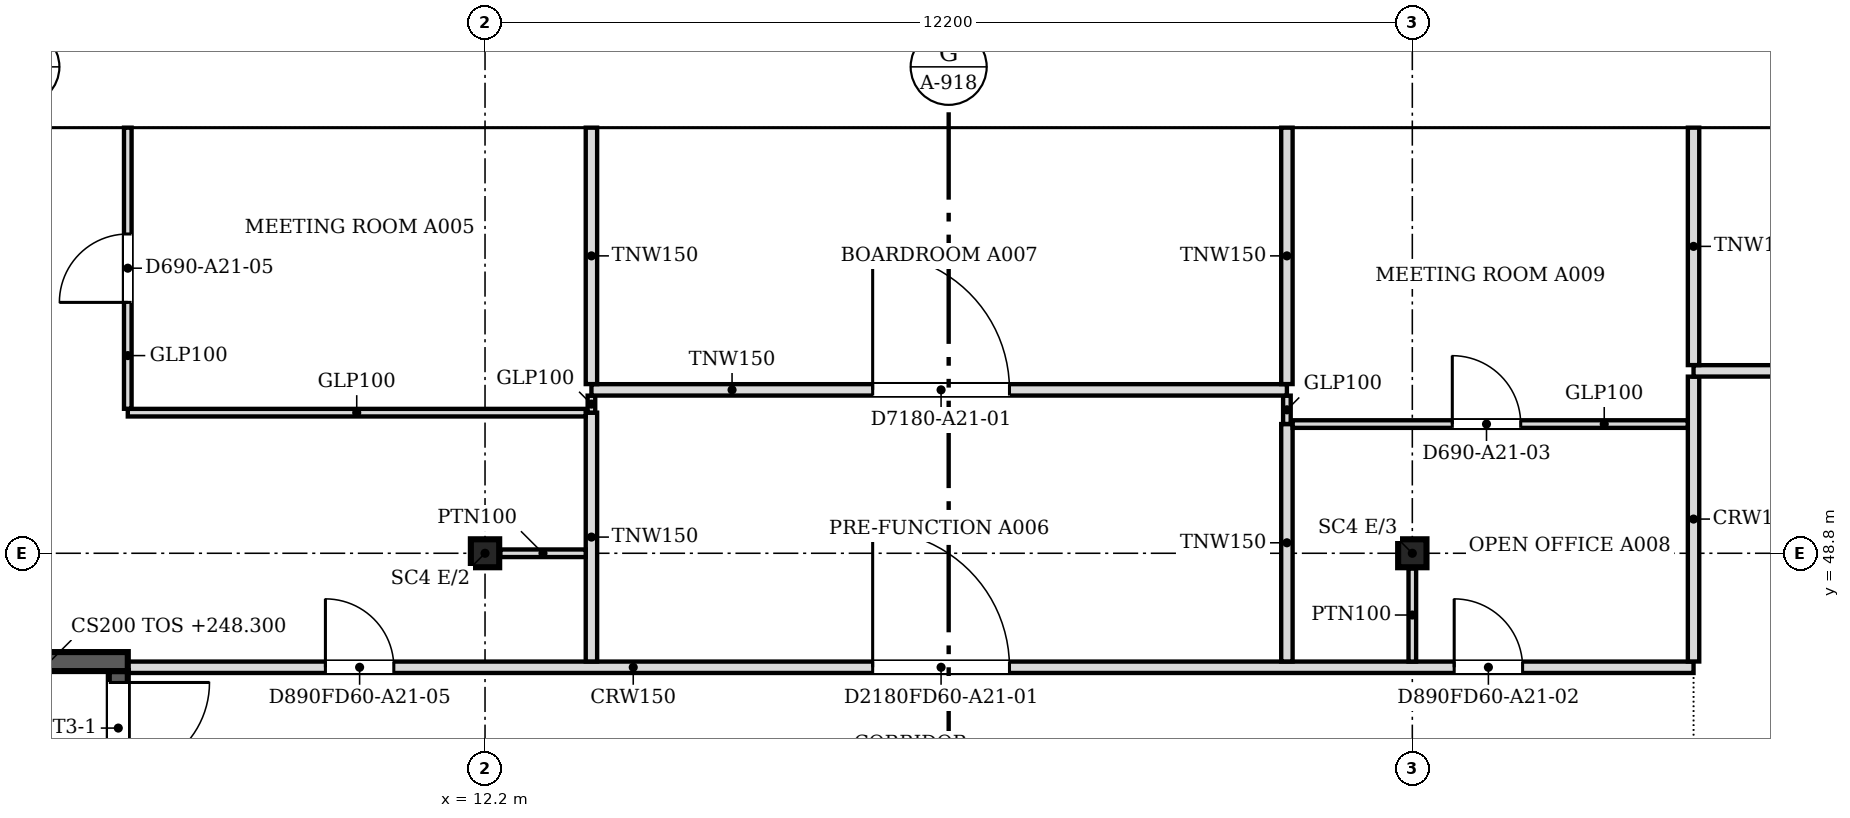
"""IFC4 building model, lengths in metres.
Left out: names, types, materials, properties, quantities, classifications, styles, units other than length and angle.
Written with IfcOpenShell. Run it as: python <this file> out.ifc"""

import sys

from ifc_helpers import new_model, si_unit, direction, frame, frame_2d, origin, origin_2d, place, context, subcontext, project, spatial, polyline, rectangle, i_section, outline, extrude, faceted_brep, source, transform, mapped, element, fill, save


model = new_model("IFC4")
c1 = context("Model", 3, precision=1e-05, world=origin(), true_north=direction((0.0, 1.0)))
c2 = subcontext(c1, "Body", "Model", "MODEL_VIEW")
j1 = project(units=[si_unit("LENGTHUNIT", "METRE"), si_unit("PLANEANGLEUNIT", "RADIAN")], contexts=[c1])
p1 = place(None, origin())
s1 = spatial("IfcSite", under=j1, at=p1, CompositionType="ELEMENT")
p2 = place(p1, origin())
s2 = spatial("IfcBuilding", under=s1, at=p2, CompositionType="ELEMENT")
p3 = place(p2, frame((0.0, 0.0, 248.3)))
s3 = spatial("IfcBuildingStorey", under=s2, at=p3, CompositionType="ELEMENT", Elevation=248.3)
for number, where, z_axis, x_axis in (
    (1, (12.2, 48.8, 0.0), (0.0, 0.0, 1.0), (1.0, 0.0, 0.0)),
    (2, (24.4, 48.8, 0.0), (0.0, 0.0, 1.0), (1.0, 0.0, 0.0)),
):
    element("IfcColumn", number, at=place(p3, frame(where, z_axis=z_axis, x_axis=x_axis)), inside=s3, PredefinedType="COLUMN", context=c2, shape_type="SweptSolid", body=[
        extrude(i_section(OverallWidth=0.373, OverallDepth=0.368, WebThickness=0.015, FlangeThickness=0.024, at=origin_2d()), origin(), (0.0, 0.0, 1.0), 3.6),
    ])
m1 = source(origin(), c2, "Body", "SweptSolid", [
    extrude(outline(polyline([(3.05, 0.0), (6.1, 3.8), (3.05, 7.6), (0.0, 3.8), (3.05, 0.0)])), frame((0.0, 0.25, 0.0), z_axis=(0.0, -1.0, 0.0), x_axis=(1.0, 0.0, 0.0)), (0.0, 0.0, 1.0), 0.5),
])
p4 = place(p3, frame((30.5, 54.65, -3.8), z_axis=(0.0, 0.0, 1.0), x_axis=(-1.0, 0.0, 0.0)))
e3 = element("IfcWall", 3, at=p4, inside=s3, PredefinedType="SOLIDWALL", context=c2, shape_type="MappedRepresentation", body=[
    mapped(m1, transform((0.0, 0.0, 0.0), scale=1.0)),
])
m2 = source(origin(), c2, "Body", "SweptSolid", [
    extrude(outline(polyline([(3.05, 0.399), (5.78, 3.8), (3.05, 7.201), (0.321, 3.8), (3.05, 0.399)])), frame((0.0, 0.26, 0.0), z_axis=(0.0, -1.0, 0.0), x_axis=(1.0, 0.0, 0.0)), (0.0, 0.0, 1.0), 0.52),
])
p5 = place(p4, origin())
e4 = element("IfcOpeningElement", 4, at=p5, cuts=e3, PredefinedType="OPENING", context=c2, shape_type="MappedRepresentation", body=[
    mapped(m2, transform((0.0, 0.0, 0.0), scale=1.0)),
])
m3 = source(origin(), c2, "Body", "Brep", [
    faceted_brep([(3.05, -0.25, 0.0), (6.1, -0.25, 3.8), (6.1, -0.25, 3.8), (3.05, -0.25, 7.6), (0.0, -0.25, 3.8), (0.0, 0.25, 3.8), (3.05, 0.25, 7.6), (6.1, 0.25, 3.8), (6.1, 0.25, 3.8), (3.05, 0.25, 0.0)], [[[0, 1, 2, 3, 4]], [[5, 6, 7, 8, 9]], [[9, 8, 1, 0]], [[7, 6, 3, 2]], [[6, 5, 4, 3]], [[5, 9, 0, 4]], [[1, 8, 7, 2]]]),
])
p6 = place(p3, frame((24.4, 54.65, -3.8), z_axis=(0.0, 0.0, 1.0), x_axis=(-1.0, 0.0, 0.0)))
e5 = element("IfcWall", 5, at=p6, inside=s3, PredefinedType="SOLIDWALL", context=c2, shape_type="MappedRepresentation", body=[
    mapped(m3, transform((0.0, 0.0, 0.0), scale=1.0)),
])
p7 = place(p6, origin())
e6 = element("IfcOpeningElement", 6, at=p7, cuts=e5, PredefinedType="OPENING", context=c2, shape_type="MappedRepresentation", body=[
    mapped(m2, transform((0.0, 0.0, 0.0), scale=1.0)),
])
p8 = place(p3, frame((18.3, 54.65, -3.8), z_axis=(0.0, 0.0, 1.0), x_axis=(-1.0, 0.0, 0.0)))
e7 = element("IfcWall", 7, at=p8, inside=s3, PredefinedType="SOLIDWALL", context=c2, shape_type="MappedRepresentation", body=[
    mapped(m1, transform((0.0, 0.0, 0.0), scale=1.0)),
])
p9 = place(p8, origin())
e8 = element("IfcOpeningElement", 8, at=p9, cuts=e7, PredefinedType="OPENING", context=c2, shape_type="MappedRepresentation", body=[
    mapped(m2, transform((0.0, 0.0, 0.0), scale=1.0)),
])
m4 = source(origin(), c2, "Body", "Brep", [
    faceted_brep([(3.05, -0.25, 0.0), (6.053, -0.25, 3.8), (3.05, -0.25, 7.6), (0.0, -0.25, 3.8), (0.0, 0.25, 3.8), (3.05, 0.25, 7.6), (6.007, 0.25, 3.859), (6.007, 0.25, 3.741), (3.05, 0.25, 0.0), (6.053, 0.0, 3.8)], [[[0, 1, 2, 3]], [[4, 5, 6, 7, 8]], [[8, 7, 9, 1, 0]], [[6, 5, 2, 1, 9]], [[5, 4, 3, 2]], [[4, 8, 0, 3]], [[9, 7, 6]]]),
])
p10 = place(p3, frame((12.2, 54.65, -3.8), z_axis=(0.0, 0.0, 1.0), x_axis=(-1.0, 0.0, 0.0)))
e9 = element("IfcWall", 9, at=p10, inside=s3, PredefinedType="SOLIDWALL", context=c2, shape_type="MappedRepresentation", body=[
    mapped(m4, transform((0.0, 0.0, 0.0), scale=1.0)),
])
m5 = source(origin(), c2, "Body", "SweptSolid", [
    extrude(outline(polyline([(3.049, 0.401), (5.735, 3.8), (3.049, 7.199), (0.321, 3.8), (3.049, 0.401)])), frame((0.0, 0.26, 0.0), z_axis=(0.0, -1.0, 0.0), x_axis=(1.0, 0.0, 0.0)), (0.0, 0.0, 1.0), 0.52),
])
p11 = place(p10, origin())
e10 = element("IfcOpeningElement", 10, at=p11, cuts=e9, PredefinedType="OPENING", context=c2, shape_type="MappedRepresentation", body=[
    mapped(m5, transform((0.0, 0.0, 0.0), scale=1.0)),
])
p12 = place(p2, frame((0.0, 0.0, 252.1)))
s4 = spatial("IfcBuildingStorey", under=s2, at=p12, CompositionType="ELEMENT", Elevation=252.1)
m6 = source(origin(), c2, "Body", "SweptSolid", [
    extrude(outline(polyline([(3.05, 0.0), (6.1, 3.8), (3.05, 7.6), (0.0, 3.8), (3.05, 0.0)])), frame((0.0, 0.25, 0.0), z_axis=(0.0, -1.0, 0.0), x_axis=(1.0, 0.0, 0.0)), (0.0, 0.0, 1.0), 0.5),
])
p13 = place(p12, frame((33.55, 54.65, -3.8), z_axis=(0.0, 0.0, 1.0), x_axis=(-1.0, 0.0, 0.0)))
e11 = element("IfcWall", 11, at=p13, inside=s4, PredefinedType="SOLIDWALL", context=c2, shape_type="MappedRepresentation", body=[
    mapped(m6, transform((0.0, 0.0, 0.0), scale=1.0)),
])
m7 = source(origin(), c2, "Body", "SweptSolid", [
    extrude(outline(polyline([(3.05, 0.399), (5.78, 3.8), (3.05, 7.2), (0.321, 3.8), (3.05, 0.399)])), frame((0.0, 0.26, 0.0), z_axis=(0.0, -1.0, 0.0), x_axis=(1.0, 0.0, 0.0)), (0.0, 0.0, 1.0), 0.52),
])
p14 = place(p13, origin())
e12 = element("IfcOpeningElement", 12, at=p14, cuts=e11, PredefinedType="OPENING", context=c2, shape_type="MappedRepresentation", body=[
    mapped(m7, transform((0.0, 0.0, 0.0), scale=1.0)),
])
m8 = source(origin(), c2, "Body", "Brep", [
    faceted_brep([(3.05, -0.25, 0.0), (6.1, -0.25, 3.8), (6.1, -0.25, 3.8), (3.05, -0.25, 7.6), (0.0, -0.25, 3.8), (0.0, 0.25, 3.8), (3.05, 0.25, 7.6), (6.1, 0.25, 3.8), (6.1, 0.25, 3.8), (3.05, 0.25, 0.0)], [[[0, 1, 2, 3, 4]], [[5, 6, 7, 8, 9]], [[9, 8, 1, 0]], [[7, 6, 3, 2]], [[6, 5, 4, 3]], [[5, 9, 0, 4]], [[1, 8, 7, 2]]]),
])
p15 = place(p12, frame((27.45, 54.65, -3.8), z_axis=(0.0, 0.0, 1.0), x_axis=(-1.0, 0.0, 0.0)))
e13 = element("IfcWall", 13, at=p15, inside=s4, PredefinedType="SOLIDWALL", context=c2, shape_type="MappedRepresentation", body=[
    mapped(m8, transform((0.0, 0.0, 0.0), scale=1.0)),
])
p16 = place(p15, origin())
e14 = element("IfcOpeningElement", 14, at=p16, cuts=e13, PredefinedType="OPENING", context=c2, shape_type="MappedRepresentation", body=[
    mapped(m7, transform((0.0, 0.0, 0.0), scale=1.0)),
])
p17 = place(p12, frame((21.35, 54.65, -3.8), z_axis=(0.0, 0.0, 1.0), x_axis=(-1.0, 0.0, 0.0)))
e15 = element("IfcWall", 15, at=p17, inside=s4, PredefinedType="SOLIDWALL", context=c2, shape_type="MappedRepresentation", body=[
    mapped(m6, transform((0.0, 0.0, 0.0), scale=1.0)),
])
p18 = place(p17, origin())
e16 = element("IfcOpeningElement", 16, at=p18, cuts=e15, PredefinedType="OPENING", context=c2, shape_type="MappedRepresentation", body=[
    mapped(m7, transform((0.0, 0.0, 0.0), scale=1.0)),
])
p19 = place(p12, frame((15.25, 54.65, -3.8), z_axis=(0.0, 0.0, 1.0), x_axis=(-1.0, 0.0, 0.0)))
e17 = element("IfcWall", 17, at=p19, inside=s4, PredefinedType="SOLIDWALL", context=c2, shape_type="MappedRepresentation", body=[
    mapped(m6, transform((0.0, 0.0, 0.0), scale=1.0)),
])
p20 = place(p19, origin())
e18 = element("IfcOpeningElement", 18, at=p20, cuts=e17, PredefinedType="OPENING", context=c2, shape_type="MappedRepresentation", body=[
    mapped(m7, transform((0.0, 0.0, 0.0), scale=1.0)),
])
m9 = source(origin(), c2, "Body", "Brep", [
    faceted_brep([(3.003, -0.25, 0.0), (3.05, -0.25, 0.06), (3.05, -0.25, 7.54), (3.003, -0.25, 7.6), (0.0, -0.25, 3.8), (0.0, 0.25, 3.8), (2.957, 0.25, 7.541), (2.957, 0.25, 0.059), (3.003, 0.0, 0.0), (3.003, 0.0, 7.6)], [[[0, 1, 2, 3, 4]], [[5, 6, 7]], [[1, 0, 8]], [[9, 3, 2]], [[6, 5, 4, 3, 9]], [[5, 7, 8, 0, 4]], [[1, 8, 7, 6, 9, 2]]]),
])
p21 = place(p12, frame((9.15, 54.65, -3.8), z_axis=(0.0, 0.0, 1.0), x_axis=(-1.0, 0.0, 0.0)))
e19 = element("IfcWall", 19, at=p21, inside=s4, PredefinedType="SOLIDWALL", context=c2, shape_type="MappedRepresentation", body=[
    mapped(m9, transform((0.0, 0.0, 0.0), scale=1.0)),
])
m10 = source(origin(), c2, "Body", "SweptSolid", [
    extrude(outline(polyline([(2.803, 6.944), (0.319, 3.8), (2.803, 0.656), (2.803, 6.944)])), frame((0.0, 0.26, 0.0), z_axis=(0.0, -1.0, 0.0), x_axis=(1.0, 0.0, 0.0)), (0.0, 0.0, 1.0), 0.52),
])
p22 = place(p21, origin())
e20 = element("IfcOpeningElement", 20, at=p22, cuts=e19, PredefinedType="OPENING", context=c2, shape_type="MappedRepresentation", body=[
    mapped(m10, transform((0.0, 0.0, 0.0), scale=1.0)),
])
p23 = place(p3, frame((3.6, 47.375, 0.0), z_axis=(0.0, 0.0, 1.0), x_axis=(1.0, 0.0, 0.0)))
e21 = element("IfcWall", 21, at=p23, inside=s3, PredefinedType="SOLIDWALL", context=c2, shape_type="SweptSolid", body=[
    extrude(rectangle(XDim=3.9, YDim=0.25, at=frame_2d((1.95, 0.0))), origin(), (0.0, 0.0, 1.0), 3.8),
])
p24 = place(p3, frame((7.375, 47.25, 0.0), z_axis=(0.0, 0.0, 1.0), x_axis=(0.0, -1.0, 0.0)))
e22 = element("IfcWall", 22, at=p24, inside=s3, PredefinedType="SOLIDWALL", context=c2, shape_type="SweptSolid", body=[
    extrude(rectangle(XDim=8.0, YDim=0.25, at=frame_2d((4.0, 0.0))), origin(), (0.0, 0.0, 1.0), 3.8),
])
m11 = source(origin(), c2, "Body", "SweptSolid", [
    extrude(rectangle(XDim=1.2, YDim=2.1, at=frame_2d((0.6, 1.05))), frame((0.0, 0.135, 0.0), z_axis=(0.0, -1.0, 0.0), x_axis=(1.0, 0.0, 0.0)), (0.0, 0.0, 1.0), 0.27),
])
p25 = place(p24, frame((0.15, 0.0, 0.0)))
e23 = element("IfcOpeningElement", 23, at=p25, cuts=e22, PredefinedType="OPENING", context=c2, shape_type="MappedRepresentation", body=[
    mapped(m11, transform((0.0, 0.0, 0.0), scale=1.0)),
])
p26 = place(p3, frame((7.5, 47.3, 0.0), z_axis=(0.0, 0.0, 1.0), x_axis=(1.0, 0.0, 0.0)))
e24 = element("IfcWall", 24, at=p26, inside=s3, PredefinedType="PARTITIONING", context=c2, shape_type="SweptSolid", body=[
    extrude(rectangle(XDim=20.6, YDim=0.15, at=frame_2d((10.3, 0.0))), origin(), (0.0, 0.0, 1.0), 3.067),
])
m12 = source(origin(), c2, "Body", "SweptSolid", [
    extrude(rectangle(XDim=0.9, YDim=2.1, at=frame_2d((0.45, 1.05))), frame((0.0, 0.085, 0.0), z_axis=(0.0, -1.0, 0.0), x_axis=(1.0, 0.0, 0.0)), (0.0, 0.0, 1.0), 0.17),
])
p27 = place(p26, frame((17.451, 0.0, 0.0)))
e25 = element("IfcOpeningElement", 25, at=p27, cuts=e24, PredefinedType="OPENING", context=c2, shape_type="MappedRepresentation", body=[
    mapped(m12, transform((0.0, 0.0, 0.0), scale=1.0)),
])
p28 = place(p26, frame((2.6, 0.0, 0.0)))
e26 = element("IfcOpeningElement", 26, at=p28, cuts=e24, PredefinedType="OPENING", context=c2, shape_type="MappedRepresentation", body=[
    mapped(m12, transform((0.0, 0.0, 0.0), scale=1.0)),
])
m13 = source(origin(), c2, "Body", "SweptSolid", [
    extrude(rectangle(XDim=1.8, YDim=2.1, at=frame_2d((0.9, 1.05))), frame((0.0, 0.085, 0.0), z_axis=(0.0, -1.0, 0.0), x_axis=(1.0, 0.0, 0.0)), (0.0, 0.0, 1.0), 0.17),
])
p29 = place(p26, frame((9.8, 0.0, 0.0)))
e27 = element("IfcOpeningElement", 27, at=p29, cuts=e24, PredefinedType="OPENING", context=c2, shape_type="MappedRepresentation", body=[
    mapped(m13, transform((0.0, 0.0, 0.0), scale=1.0)),
])
p30 = place(p3, frame((13.6, 47.376, 0.0), z_axis=(0.0, 0.0, 1.0), x_axis=(0.0, 1.0, 0.0)))
e28 = element("IfcWall", 28, at=p30, inside=s3, PredefinedType="PARTITIONING", context=c2, shape_type="SweptSolid", body=[
    extrude(rectangle(XDim=3.274, YDim=0.15, at=frame_2d((1.637, 0.0))), origin(), (0.0, 0.0, 1.0), 3.067),
])
p31 = place(p3, frame((22.75, 47.376, 0.0), z_axis=(0.0, 0.0, 1.0), x_axis=(0.0, 1.0, 0.0)))
e29 = element("IfcWall", 29, at=p31, inside=s3, PredefinedType="PARTITIONING", context=c2, shape_type="SweptSolid", body=[
    extrude(rectangle(XDim=3.124, YDim=0.15, at=frame_2d((1.562, 0.0))), origin(), (0.0, 0.0, 1.0), 3.067),
])
p32 = place(p3, frame((28.1, 47.376, 0.0), z_axis=(0.0, 0.0, 1.0), x_axis=(0.0, 1.0, 0.0)))
e30 = element("IfcWall", 30, at=p32, inside=s3, PredefinedType="PARTITIONING", context=c2, shape_type="SweptSolid", body=[
    extrude(rectangle(XDim=3.748, YDim=0.15, at=frame_2d((1.874, 0.0))), origin(), (0.0, 0.0, 1.0), 3.067),
])
p33 = place(p3, frame((24.4, 48.6, 0.0), z_axis=(0.0, 0.0, 1.0), x_axis=(0.0, -1.0, 0.0)))
e31 = element("IfcWall", 31, at=p33, inside=s3, PredefinedType="PARTITIONING", context=c2, shape_type="SweptSolid", body=[
    extrude(rectangle(XDim=1.225, YDim=0.1, at=frame_2d((0.613, 0.0))), origin(), (0.0, 0.0, 1.0), 3.067),
])
p34 = place(p3, frame((12.4, 48.8, 0.0), z_axis=(0.0, 0.0, 1.0), x_axis=(1.0, 0.0, 0.0)))
e32 = element("IfcWall", 32, at=p34, inside=s3, PredefinedType="PARTITIONING", context=c2, shape_type="SweptSolid", body=[
    extrude(rectangle(XDim=1.125, YDim=0.1, at=frame_2d((0.562, 0.0))), origin(), (0.0, 0.0, 1.0), 3.067),
])
p35 = place(p3, frame((22.75, 50.501, 0.0), z_axis=(0.0, 0.0, 1.0), x_axis=(0.0, 1.0, 0.0)))
e33 = element("IfcWall", 33, at=p35, inside=s3, PredefinedType="PARTITIONING", context=c2, shape_type="SweptSolid", body=[
    extrude(rectangle(XDim=0.373, YDim=0.1, at=frame_2d((0.187, 0.0))), origin(), (0.0, 0.0, 1.0), 3.067),
])
p36 = place(p3, frame((22.826, 50.5, 0.0), z_axis=(0.0, 0.0, 1.0), x_axis=(1.0, 0.0, 0.0)))
e34 = element("IfcWall", 34, at=p36, inside=s3, PredefinedType="PARTITIONING", context=c2, shape_type="SweptSolid", body=[
    extrude(rectangle(XDim=5.198, YDim=0.1, at=frame_2d((2.599, 0.0))), origin(), (0.0, 0.0, 1.0), 3.067),
])
m14 = source(origin(), c2, "Body", "SweptSolid", [
    extrude(rectangle(XDim=0.9, YDim=2.1, at=frame_2d((0.45, 1.05))), frame((0.0, 0.06, 0.0), z_axis=(0.0, -1.0, 0.0), x_axis=(1.0, 0.0, 0.0)), (0.0, 0.0, 1.0), 0.12),
])
p37 = place(p36, frame((2.1, 0.0, 0.0)))
e35 = element("IfcOpeningElement", 35, at=p37, cuts=e34, PredefinedType="OPENING", context=c2, shape_type="MappedRepresentation", body=[
    mapped(m14, transform((0.0, 0.0, 0.0), scale=1.0)),
])
p38 = place(p3, frame((7.5, 50.65, 0.0), z_axis=(0.0, 0.0, 1.0), x_axis=(1.0, 0.0, 0.0)))
e36 = element("IfcWall", 36, at=p38, inside=s3, PredefinedType="PARTITIONING", context=c2, shape_type="SweptSolid", body=[
    extrude(rectangle(XDim=6.024, YDim=0.1, at=frame_2d((3.012, 0.0))), origin(), (0.0, 0.0, 1.0), 3.067),
])
p39 = place(p3, frame((13.6, 50.651, 0.0), z_axis=(0.0, 0.0, 1.0), x_axis=(0.0, 1.0, 0.0)))
e37 = element("IfcWall", 37, at=p39, inside=s3, PredefinedType="PARTITIONING", context=c2, shape_type="SweptSolid", body=[
    extrude(rectangle(XDim=0.223, YDim=0.1, at=frame_2d((0.112, 0.0))), origin(), (0.0, 0.0, 1.0), 3.067),
])
p40 = place(p3, frame((7.5, 54.4, 0.0), z_axis=(0.0, 0.0, 1.0), x_axis=(0.0, -1.0, 0.0)))
e38 = element("IfcWall", 38, at=p40, inside=s3, PredefinedType="PARTITIONING", context=c2, shape_type="SweptSolid", body=[
    extrude(rectangle(XDim=3.699, YDim=0.1, at=frame_2d((1.85, 0.0))), origin(), (0.0, 0.0, 1.0), 3.067),
])
p41 = place(p40, frame((1.399, 0.0, 0.0)))
e39 = element("IfcOpeningElement", 39, at=p41, cuts=e38, PredefinedType="OPENING", context=c2, shape_type="MappedRepresentation", body=[
    mapped(m14, transform((0.0, 0.0, 0.0), scale=1.0)),
])
p42 = place(p3, frame((13.6, 50.95, 0.0), z_axis=(0.0, 0.0, 1.0), x_axis=(1.0, 0.0, 0.0)))
e40 = element("IfcWall", 40, at=p42, inside=s3, PredefinedType="PARTITIONING", context=c2, shape_type="SweptSolid", body=[
    extrude(rectangle(XDim=9.15, YDim=0.15, at=frame_2d((4.575, 0.0))), origin(), (0.0, 0.0, 1.0), 3.067),
])
p43 = place(p42, frame((3.7, 0.0, 0.0)))
e41 = element("IfcOpeningElement", 41, at=p43, cuts=e40, PredefinedType="OPENING", context=c2, shape_type="MappedRepresentation", body=[
    mapped(m13, transform((0.0, 0.0, 0.0), scale=1.0)),
])
for number, where, z_axis, x_axis in (
    (42, (13.6, 51.026, 0.0), (0.0, 0.0, 1.0), (0.0, 1.0, 0.0)),
    (43, (22.75, 51.026, 0.0), (0.0, 0.0, 1.0), (0.0, 1.0, 0.0)),
):
    element("IfcWall", number, at=place(p3, frame(where, z_axis=z_axis, x_axis=x_axis)), inside=s3, PredefinedType="PARTITIONING", context=c2, shape_type="SweptSolid", body=[
        extrude(rectangle(XDim=3.374, YDim=0.15, at=frame_2d((1.687, 0.0))), origin(), (0.0, 0.0, 1.0), 3.067),
    ])
p44 = place(p3, frame((28.1, 51.2, 0.0), z_axis=(0.0, 0.0, 1.0), x_axis=(1.0, 0.0, 0.0)))
e44 = element("IfcWall", 44, at=p44, inside=s3, PredefinedType="PARTITIONING", context=c2, shape_type="SweptSolid", body=[
    extrude(rectangle(XDim=31.438, YDim=0.15, at=frame_2d((15.719, 0.0))), origin(), (0.0, 0.0, 1.0), 3.067),
])
p45 = place(p44, frame((4.1, 0.0, 0.0)))
e45 = element("IfcOpeningElement", 45, at=p45, cuts=e44, PredefinedType="OPENING", context=c2, shape_type="MappedRepresentation", body=[
    mapped(m12, transform((0.0, 0.0, 0.0), scale=1.0)),
])
p46 = place(p44, frame((25.951, 0.0, 0.0)))
e46 = element("IfcOpeningElement", 46, at=p46, cuts=e44, PredefinedType="OPENING", context=c2, shape_type="MappedRepresentation", body=[
    mapped(m12, transform((0.0, 0.0, 0.0), scale=1.0)),
])
p47 = place(p44, frame((14.75, 0.0, 0.0)))
e47 = element("IfcOpeningElement", 47, at=p47, cuts=e44, PredefinedType="OPENING", context=c2, shape_type="MappedRepresentation", body=[
    mapped(m12, transform((0.0, 0.0, 0.0), scale=1.0)),
])
p48 = place(p3, frame((28.1, 51.276, 0.0), z_axis=(0.0, 0.0, 1.0), x_axis=(0.0, 1.0, 0.0)))
e48 = element("IfcWall", 48, at=p48, inside=s3, PredefinedType="PARTITIONING", context=c2, shape_type="SweptSolid", body=[
    extrude(rectangle(XDim=3.124, YDim=0.15, at=frame_2d((1.562, 0.0))), origin(), (0.0, 0.0, 1.0), 3.067),
])
m15 = source(origin(), c2, "Body", "SweptSolid", [
    extrude(rectangle(XDim=1.2, YDim=2.1, at=frame_2d((0.6, 1.05))), frame((0.0, 0.025, 0.0), z_axis=(0.0, -1.0, 0.0), x_axis=(1.0, 0.0, 0.0)), (0.0, 0.0, 1.0), 0.05),
])
p49 = place(p25, origin())
e49 = element("IfcDoor", 49, at=p49, inside=s3, OperationType="SINGLE_SWING_LEFT", PredefinedType="DOOR", context=c2, shape_type="MappedRepresentation", body=[
    mapped(m15, transform((0.0, 0.0, 0.0), scale=1.0)),
])
fill(e23, e49)
m16 = source(origin(), c2, "Body", "SweptSolid", [
    extrude(rectangle(XDim=0.9, YDim=2.1, at=frame_2d((0.45, 1.05))), frame((0.0, 0.025, 0.0), z_axis=(0.0, -1.0, 0.0), x_axis=(1.0, 0.0, 0.0)), (0.0, 0.0, 1.0), 0.05),
])
p50 = place(p37, origin())
e50 = element("IfcDoor", 50, at=p50, inside=s3, OperationType="SINGLE_SWING_LEFT", PredefinedType="DOOR", context=c2, shape_type="MappedRepresentation", body=[
    mapped(m16, transform((0.0, 0.0, 0.0), scale=1.0)),
])
fill(e35, e50)
p51 = place(p27, origin())
e51 = element("IfcDoor", 51, at=p51, inside=s3, OperationType="SINGLE_SWING_LEFT", PredefinedType="DOOR", context=c2, shape_type="MappedRepresentation", body=[
    mapped(m16, transform((0.0, 0.0, 0.0), scale=1.0)),
])
fill(e25, e51)
p52 = place(p28, origin())
e52 = element("IfcDoor", 52, at=p52, inside=s3, OperationType="SINGLE_SWING_LEFT", PredefinedType="DOOR", context=c2, shape_type="MappedRepresentation", body=[
    mapped(m16, transform((0.0, 0.0, 0.0), scale=1.0)),
])
fill(e26, e52)
m17 = source(origin(), c2, "Body", "SweptSolid", [
    extrude(rectangle(XDim=1.8, YDim=2.1, at=frame_2d((0.9, 1.05))), frame((0.0, 0.025, 0.0), z_axis=(0.0, -1.0, 0.0), x_axis=(1.0, 0.0, 0.0)), (0.0, 0.0, 1.0), 0.05),
])
p53 = place(p29, origin())
e53 = element("IfcDoor", 53, at=p53, inside=s3, OperationType="DOUBLE_DOOR_SINGLE_SWING", PredefinedType="DOOR", context=c2, shape_type="MappedRepresentation", body=[
    mapped(m17, transform((0.0, 0.0, 0.0), scale=1.0)),
])
fill(e27, e53)
p54 = place(p43, origin())
e54 = element("IfcDoor", 54, at=p54, inside=s3, OperationType="DOUBLE_DOOR_SINGLE_SWING", PredefinedType="DOOR", context=c2, shape_type="MappedRepresentation", body=[
    mapped(m17, transform((0.0, 0.0, 0.0), scale=1.0)),
])
fill(e41, e54)
p55 = place(p41, origin())
e55 = element("IfcDoor", 55, at=p55, inside=s3, OperationType="SINGLE_SWING_RIGHT", PredefinedType="DOOR", context=c2, shape_type="MappedRepresentation", body=[
    mapped(m16, transform((0.0, 0.0, 0.0), scale=1.0)),
])
fill(e39, e55)
save(model, sys.argv[1])
